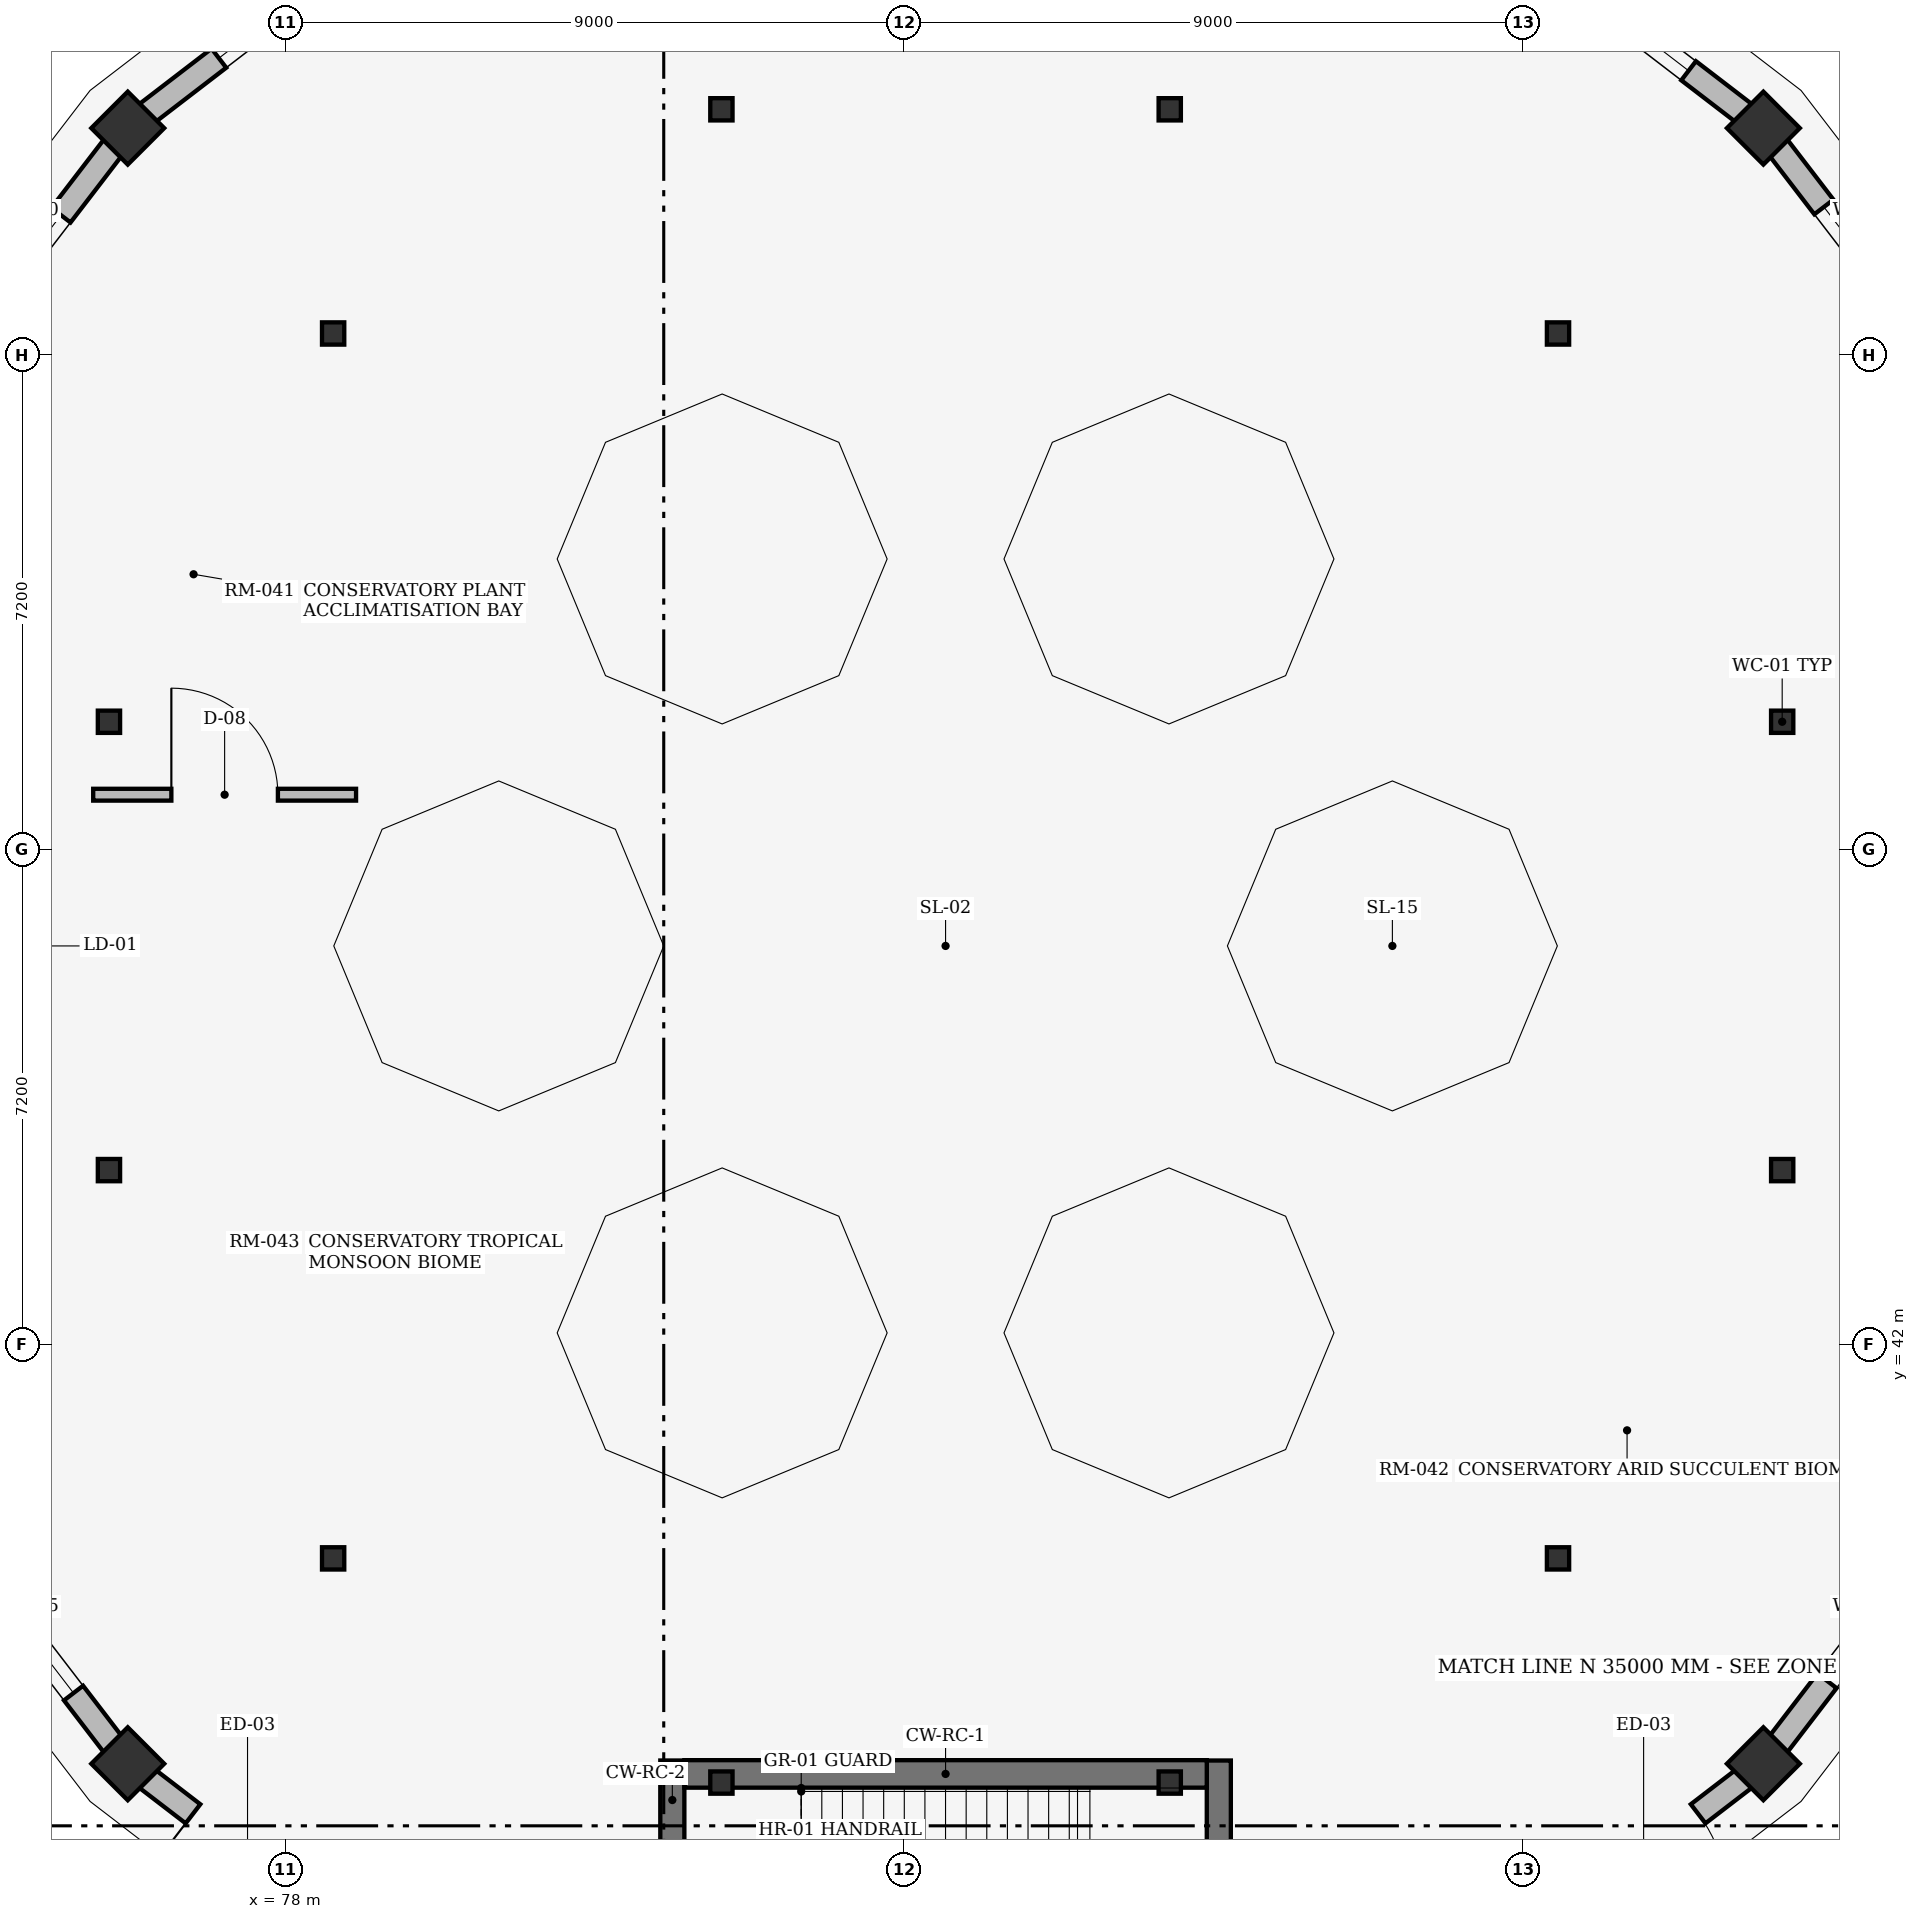
"""IFC4 building model, lengths in metres.
Left out: names, types, materials, properties, quantities, classifications, styles, units other than length and angle.
Written with IfcOpenShell. Run it as: python <this file> out.ifc"""

import sys

from ifc_helpers import new_model, si_unit, direction, frame, frame_2d, origin, origin_2d, place, context, subcontext, project, spatial, rectangle, hollow_circle, extrude, element, fill, save


model = new_model("IFC4")
c1 = context("Model", 3, precision=1e-05, world=origin(), true_north=direction((0.0, 1.0)))
c2 = subcontext(c1, "Body", "Model", "MODEL_VIEW")
j1 = project(units=[si_unit("LENGTHUNIT", "METRE"), si_unit("PLANEANGLEUNIT", "RADIAN")], contexts=[c1])
p1 = place(None, origin())
s1 = spatial("IfcSite", under=j1, at=p1, CompositionType="ELEMENT")
p2 = place(p1, origin())
s2 = spatial("IfcBuilding", under=s1, at=p2, CompositionType="ELEMENT")
p3 = place(p2, origin())
s3 = spatial("IfcBuildingStorey", under=s2, at=p3, CompositionType="ELEMENT", Elevation=0.0)
for number, where, z_axis, x_axis in (
    (1, (99.497, 59.697, 0.0), (0.0, 0.0, 1.0), (0.707, 0.707, 0.0)),
    (2, (75.703, 59.697, 0.0), (0.0, 0.0, 1.0), (-0.707, 0.707, 0.0)),
    (3, (75.703, 35.903, 0.0), (0.0, 0.0, 1.0), (-0.707, -0.707, 0.0)),
    (4, (99.497, 35.903, 0.0), (0.0, 0.0, 1.0), (0.707, -0.707, 0.0)),
):
    element("IfcColumn", number, at=place(p3, frame(where, z_axis=z_axis, x_axis=x_axis)), inside=s3, PredefinedType="COLUMN", context=c2, shape_type="SweptSolid", body=[
        extrude(rectangle(XDim=0.75, YDim=0.75, at=origin_2d()), origin(), (0.0, 0.0, 1.0), 4.55),
    ])
for number, where, z_axis, x_axis in (
    (5, (99.771, 51.061, 0.0), (0.0, 0.0, 1.0), (1.0, 0.0, 0.0)),
    (6, (96.51, 56.709, 0.0), (0.0, 0.0, 1.0), (1.0, 0.0, 0.0)),
    (7, (90.861, 59.971, 0.0), (0.0, 0.0, 1.0), (1.0, 0.0, 0.0)),
    (8, (84.339, 59.971, 0.0), (0.0, 0.0, 1.0), (1.0, 0.0, 0.0)),
    (9, (78.69, 56.709, 0.0), (0.0, 0.0, 1.0), (1.0, 0.0, 0.0)),
    (10, (75.429, 51.061, 0.0), (0.0, 0.0, 1.0), (1.0, 0.0, 0.0)),
    (11, (75.429, 44.539, 0.0), (0.0, 0.0, 1.0), (1.0, 0.0, 0.0)),
    (12, (78.69, 38.89, 0.0), (0.0, 0.0, 1.0), (1.0, 0.0, 0.0)),
    (13, (84.339, 35.629, 0.0), (0.0, 0.0, 1.0), (1.0, 0.0, 0.0)),
    (14, (90.861, 35.629, 0.0), (0.0, 0.0, 1.0), (1.0, 0.0, 0.0)),
    (15, (96.51, 38.89, 0.0), (0.0, 0.0, 1.0), (1.0, 0.0, 0.0)),
    (16, (99.771, 44.539, 0.0), (0.0, 0.0, 1.0), (1.0, 0.0, 0.0)),
):
    element("IfcColumn", number, at=place(p3, frame(where, z_axis=z_axis, x_axis=x_axis)), inside=s3, PredefinedType="COLUMN", context=c2, shape_type="SweptSolid", body=[
        extrude(hollow_circle(Radius=0.162, WallThickness=0.016, at=origin_2d()), origin(), (0.0, 0.0, 1.0), 4.55),
    ])
p4 = place(p3, frame((102.171, 56.212, 0.0), z_axis=(0.0, 0.0, 1.0), x_axis=(-0.608759396381, 0.793354899977, 0.0)))
e17 = element("IfcWall", 17, at=p4, inside=s3, PredefinedType="STANDARD", context=c2, shape_type="SweptSolid", body=[
    extrude(rectangle(XDim=4.392, YDim=0.35, at=frame_2d((2.196, 0.0))), origin(), (0.0, 0.0, 1.0), 4.55),
])
p5 = place(p4, frame((1.446, 0.0, 1.1)))
e18 = element("IfcOpeningElement", 18, at=p5, cuts=e17, PredefinedType="OPENING", context=c2, shape_type="SweptSolid", body=[
    extrude(rectangle(XDim=1.5, YDim=1.8, at=frame_2d((0.75, 0.9))), frame((0.0, 0.185, 0.0), z_axis=(0.0, -1.0, 0.0), x_axis=(1.0, 0.0, 0.0)), (0.0, 0.0, 1.0), 0.37),
])
p6 = place(p3, frame((99.497, 59.697, 0.0), z_axis=(0.0, 0.0, 1.0), x_axis=(-0.793354899977, 0.608759396381, 0.0)))
e19 = element("IfcWall", 19, at=p6, inside=s3, PredefinedType="STANDARD", context=c2, shape_type="SweptSolid", body=[
    extrude(rectangle(XDim=4.392, YDim=0.35, at=frame_2d((2.196, 0.0))), origin(), (0.0, 0.0, 1.0), 4.55),
])
p7 = place(p6, frame((1.371, 0.0, 1.1)))
e20 = element("IfcOpeningElement", 20, at=p7, cuts=e19, PredefinedType="OPENING", context=c2, shape_type="SweptSolid", body=[
    extrude(rectangle(XDim=1.65, YDim=1.8, at=frame_2d((0.825, 0.9))), frame((0.0, 0.185, 0.0), z_axis=(0.0, -1.0, 0.0), x_axis=(1.0, 0.0, 0.0)), (0.0, 0.0, 1.0), 0.37),
])
p8 = place(p3, frame((79.188, 62.371, 0.0), z_axis=(0.0, 0.0, 1.0), x_axis=(-0.793354899977, -0.608759396381, 0.0)))
e21 = element("IfcWall", 21, at=p8, inside=s3, PredefinedType="STANDARD", context=c2, shape_type="SweptSolid", body=[
    extrude(rectangle(XDim=4.392, YDim=0.35, at=frame_2d((2.196, 0.0))), origin(), (0.0, 0.0, 1.0), 4.55),
])
p9 = place(p8, frame((1.671, 0.0, 1.1)))
e22 = element("IfcOpeningElement", 22, at=p9, cuts=e21, PredefinedType="OPENING", context=c2, shape_type="SweptSolid", body=[
    extrude(rectangle(XDim=1.05, YDim=2.1, at=frame_2d((0.525, 1.05))), frame((0.0, 0.185, 0.0), z_axis=(0.0, -1.0, 0.0), x_axis=(1.0, 0.0, 0.0)), (0.0, 0.0, 1.0), 0.37),
])
p10 = place(p3, frame((75.703, 59.697, 0.0), z_axis=(0.0, 0.0, 1.0), x_axis=(-0.608759396381, -0.793354899977, 0.0)))
e23 = element("IfcWall", 23, at=p10, inside=s3, PredefinedType="STANDARD", context=c2, shape_type="SweptSolid", body=[
    extrude(rectangle(XDim=4.392, YDim=0.35, at=frame_2d((2.196, 0.0))), origin(), (0.0, 0.0, 1.0), 4.55),
])
p11 = place(p10, frame((1.596, 0.0, 1.1)))
e24 = element("IfcOpeningElement", 24, at=p11, cuts=e23, PredefinedType="OPENING", context=c2, shape_type="SweptSolid", body=[
    extrude(rectangle(XDim=1.2, YDim=2.1, at=frame_2d((0.6, 1.05))), frame((0.0, 0.185, 0.0), z_axis=(0.0, -1.0, 0.0), x_axis=(1.0, 0.0, 0.0)), (0.0, 0.0, 1.0), 0.37),
])
p12 = place(p3, frame((73.029, 39.387, 0.0), z_axis=(0.0, 0.0, 1.0), x_axis=(0.608759396381, -0.793354899977, 0.0)))
e25 = element("IfcWall", 25, at=p12, inside=s3, PredefinedType="STANDARD", context=c2, shape_type="SweptSolid", body=[
    extrude(rectangle(XDim=4.392, YDim=0.35, at=frame_2d((2.196, 0.0))), origin(), (0.0, 0.0, 1.0), 4.55),
])
p13 = place(p12, frame((1.296, 0.0, 1.1)))
e26 = element("IfcOpeningElement", 26, at=p13, cuts=e25, PredefinedType="OPENING", context=c2, shape_type="SweptSolid", body=[
    extrude(rectangle(XDim=1.8, YDim=1.8, at=frame_2d((0.9, 0.9))), frame((0.0, 0.185, 0.0), z_axis=(0.0, -1.0, 0.0), x_axis=(1.0, 0.0, 0.0)), (0.0, 0.0, 1.0), 0.37),
])
p14 = place(p3, frame((75.703, 35.903, 0.0), z_axis=(0.0, 0.0, 1.0), x_axis=(0.793354899977, -0.608759396381, 0.0)))
e27 = element("IfcWall", 27, at=p14, inside=s3, PredefinedType="STANDARD", context=c2, shape_type="SweptSolid", body=[
    extrude(rectangle(XDim=4.392, YDim=0.35, at=frame_2d((2.196, 0.0))), origin(), (0.0, 0.0, 1.0), 4.55),
])
p15 = place(p14, frame((1.196, 0.0, 0.0)))
e28 = element("IfcOpeningElement", 28, at=p15, cuts=e27, PredefinedType="OPENING", context=c2, shape_type="SweptSolid", body=[
    extrude(rectangle(XDim=2.0, YDim=2.35, at=frame_2d((1.0, 1.175))), frame((0.0, 0.185, 0.0), z_axis=(0.0, -1.0, 0.0), x_axis=(1.0, 0.0, 0.0)), (0.0, 0.0, 1.0), 0.37),
])
p16 = place(p3, frame((96.012, 33.229, 0.0), z_axis=(0.0, 0.0, 1.0), x_axis=(0.793354899977, 0.608759396381, 0.0)))
e29 = element("IfcWall", 29, at=p16, inside=s3, PredefinedType="STANDARD", context=c2, shape_type="SweptSolid", body=[
    extrude(rectangle(XDim=4.392, YDim=0.35, at=frame_2d((2.196, 0.0))), origin(), (0.0, 0.0, 1.0), 4.55),
])
p17 = place(p16, frame((1.196, 0.0, 0.0)))
e30 = element("IfcOpeningElement", 30, at=p17, cuts=e29, PredefinedType="OPENING", context=c2, shape_type="SweptSolid", body=[
    extrude(rectangle(XDim=2.0, YDim=2.35, at=frame_2d((1.0, 1.175))), frame((0.0, 0.185, 0.0), z_axis=(0.0, -1.0, 0.0), x_axis=(1.0, 0.0, 0.0)), (0.0, 0.0, 1.0), 0.37),
])
p18 = place(p3, frame((99.497, 35.903, 0.0), z_axis=(0.0, 0.0, 1.0), x_axis=(0.608759396381, 0.793354899977, 0.0)))
e31 = element("IfcWall", 31, at=p18, inside=s3, PredefinedType="STANDARD", context=c2, shape_type="SweptSolid", body=[
    extrude(rectangle(XDim=4.392, YDim=0.35, at=frame_2d((2.196, 0.0))), origin(), (0.0, 0.0, 1.0), 4.55),
])
p19 = place(p18, frame((1.521, 0.0, 1.1)))
e32 = element("IfcOpeningElement", 32, at=p19, cuts=e31, PredefinedType="OPENING", context=c2, shape_type="SweptSolid", body=[
    extrude(rectangle(XDim=1.35, YDim=1.8, at=frame_2d((0.675, 0.9))), frame((0.0, 0.185, 0.0), z_axis=(0.0, -1.0, 0.0), x_axis=(1.0, 0.0, 0.0)), (0.0, 0.0, 1.0), 0.37),
])
p20 = place(p3, frame((83.625, 31.7, 0.0), z_axis=(0.0, 0.0, 1.0), x_axis=(0.0, 1.0, 0.0)))
e33 = element("IfcWall", 33, at=p20, inside=s3, PredefinedType="SHEAR", context=c2, shape_type="SweptSolid", body=[
    extrude(rectangle(XDim=4.25, YDim=0.35, at=frame_2d((2.125, 0.0))), origin(), (0.0, 0.0, 1.0), 4.48),
])
p21 = place(p20, frame((1.5, 0.0, 0.0)))
e34 = element("IfcOpeningElement", 34, at=p21, cuts=e33, PredefinedType="OPENING", context=c2, shape_type="SweptSolid", body=[
    extrude(rectangle(XDim=1.25, YDim=2.2, at=frame_2d((0.625, 1.1))), frame((0.0, 0.185, 0.0), z_axis=(0.0, -1.0, 0.0), x_axis=(1.0, 0.0, 0.0)), (0.0, 0.0, 1.0), 0.37),
])
p22 = place(p3, frame((91.575, 31.7, 0.0), z_axis=(0.0, 0.0, 1.0), x_axis=(0.0, 1.0, 0.0)))
e35 = element("IfcWall", 35, at=p22, inside=s3, PredefinedType="SHEAR", context=c2, shape_type="SweptSolid", body=[
    extrude(rectangle(XDim=4.25, YDim=0.35, at=frame_2d((2.125, 0.0))), origin(), (0.0, 0.0, 1.0), 4.48),
])
p23 = place(p3, frame((83.8, 35.755, 0.0), z_axis=(0.0, 0.0, 1.0), x_axis=(1.0, 0.0, 0.0)))
e36 = element("IfcWall", 36, at=p23, inside=s3, PredefinedType="SHEAR", context=c2, shape_type="SweptSolid", body=[
    extrude(rectangle(XDim=7.6, YDim=0.4, at=frame_2d((3.8, 0.0))), origin(), (0.0, 0.0, 1.0), 4.48),
])
p24 = place(p3, frame((75.2, 50.0, 0.0), z_axis=(0.0, 0.0, 1.0), x_axis=(1.0, 0.0, 0.0)))
e37 = element("IfcWall", 37, at=p24, inside=s3, PredefinedType="PARTITIONING", context=c2, shape_type="SweptSolid", body=[
    extrude(rectangle(XDim=3.824, YDim=0.172, at=frame_2d((1.912, 0.0))), origin(), (0.0, 0.0, 1.0), 4.45),
])
p25 = place(p24, frame((1.137, 0.0, 0.0)))
e38 = element("IfcOpeningElement", 38, at=p25, cuts=e37, PredefinedType="OPENING", context=c2, shape_type="SweptSolid", body=[
    extrude(rectangle(XDim=1.55, YDim=2.25, at=frame_2d((0.775, 1.125))), frame((0.0, 0.096, 0.0), z_axis=(0.0, -1.0, 0.0), x_axis=(1.0, 0.0, 0.0)), (0.0, 0.0, 1.0), 0.192),
])
p26 = place(p5, origin())
e39 = element("IfcWindow", 39, at=p26, inside=s3, PartitioningType="SINGLE_PANEL", PredefinedType="WINDOW", context=c2, shape_type="SweptSolid", body=[
    extrude(rectangle(XDim=1.5, YDim=1.8, at=frame_2d((0.75, 0.9))), frame((0.0, 0.03, 0.0), z_axis=(0.0, -1.0, 0.0), x_axis=(1.0, 0.0, 0.0)), (0.0, 0.0, 1.0), 0.06),
])
fill(e18, e39)
p27 = place(p7, origin())
e40 = element("IfcWindow", 40, at=p27, inside=s3, PartitioningType="SINGLE_PANEL", PredefinedType="WINDOW", context=c2, shape_type="SweptSolid", body=[
    extrude(rectangle(XDim=1.65, YDim=1.8, at=frame_2d((0.825, 0.9))), frame((0.0, 0.03, 0.0), z_axis=(0.0, -1.0, 0.0), x_axis=(1.0, 0.0, 0.0)), (0.0, 0.0, 1.0), 0.06),
])
fill(e20, e40)
p28 = place(p9, origin())
e41 = element("IfcWindow", 41, at=p28, inside=s3, PartitioningType="SINGLE_PANEL", PredefinedType="WINDOW", context=c2, shape_type="SweptSolid", body=[
    extrude(rectangle(XDim=1.05, YDim=2.1, at=frame_2d((0.525, 1.05))), frame((0.0, 0.03, 0.0), z_axis=(0.0, -1.0, 0.0), x_axis=(1.0, 0.0, 0.0)), (0.0, 0.0, 1.0), 0.06),
])
fill(e22, e41)
p29 = place(p11, origin())
e42 = element("IfcWindow", 42, at=p29, inside=s3, PartitioningType="SINGLE_PANEL", PredefinedType="WINDOW", context=c2, shape_type="SweptSolid", body=[
    extrude(rectangle(XDim=1.2, YDim=2.1, at=frame_2d((0.6, 1.05))), frame((0.0, 0.03, 0.0), z_axis=(0.0, -1.0, 0.0), x_axis=(1.0, 0.0, 0.0)), (0.0, 0.0, 1.0), 0.06),
])
fill(e24, e42)
p30 = place(p13, origin())
e43 = element("IfcWindow", 43, at=p30, inside=s3, PartitioningType="SINGLE_PANEL", PredefinedType="WINDOW", context=c2, shape_type="SweptSolid", body=[
    extrude(rectangle(XDim=1.8, YDim=1.8, at=frame_2d((0.9, 0.9))), frame((0.0, 0.03, 0.0), z_axis=(0.0, -1.0, 0.0), x_axis=(1.0, 0.0, 0.0)), (0.0, 0.0, 1.0), 0.06),
])
fill(e26, e43)
p31 = place(p15, frame((2.0, 0.0, 0.0), z_axis=(0.0, 0.0, 1.0), x_axis=(-1.0, 0.0, 0.0)))
e44 = element("IfcDoor", 44, at=p31, inside=s3, OperationType="DOUBLE_DOOR_SINGLE_SWING", PredefinedType="DOOR", context=c2, shape_type="SweptSolid", body=[
    extrude(rectangle(XDim=2.0, YDim=2.35, at=frame_2d((1.0, 1.175))), frame((0.0, 0.025, 0.0), z_axis=(0.0, -1.0, 0.0), x_axis=(1.0, 0.0, 0.0)), (0.0, 0.0, 1.0), 0.05),
])
fill(e28, e44)
p32 = place(p17, frame((2.0, 0.0, 0.0), z_axis=(0.0, 0.0, 1.0), x_axis=(-1.0, 0.0, 0.0)))
e45 = element("IfcDoor", 45, at=p32, inside=s3, OperationType="DOUBLE_DOOR_SINGLE_SWING", PredefinedType="DOOR", context=c2, shape_type="SweptSolid", body=[
    extrude(rectangle(XDim=2.0, YDim=2.35, at=frame_2d((1.0, 1.175))), frame((0.0, 0.025, 0.0), z_axis=(0.0, -1.0, 0.0), x_axis=(1.0, 0.0, 0.0)), (0.0, 0.0, 1.0), 0.05),
])
fill(e30, e45)
p33 = place(p19, origin())
e46 = element("IfcWindow", 46, at=p33, inside=s3, PartitioningType="SINGLE_PANEL", PredefinedType="WINDOW", context=c2, shape_type="SweptSolid", body=[
    extrude(rectangle(XDim=1.35, YDim=1.8, at=frame_2d((0.675, 0.9))), frame((0.0, 0.03, 0.0), z_axis=(0.0, -1.0, 0.0), x_axis=(1.0, 0.0, 0.0)), (0.0, 0.0, 1.0), 0.06),
])
fill(e32, e46)
p34 = place(p25, origin())
e47 = element("IfcDoor", 47, at=p34, inside=s3, OperationType="DOUBLE_DOOR_SINGLE_SWING", PredefinedType="DOOR", context=c2, shape_type="SweptSolid", body=[
    extrude(rectangle(XDim=1.55, YDim=2.25, at=frame_2d((0.775, 1.125))), frame((0.0, 0.025, 0.0), z_axis=(0.0, -1.0, 0.0), x_axis=(1.0, 0.0, 0.0)), (0.0, 0.0, 1.0), 0.05),
])
fill(e38, e47)
save(model, sys.argv[1])
